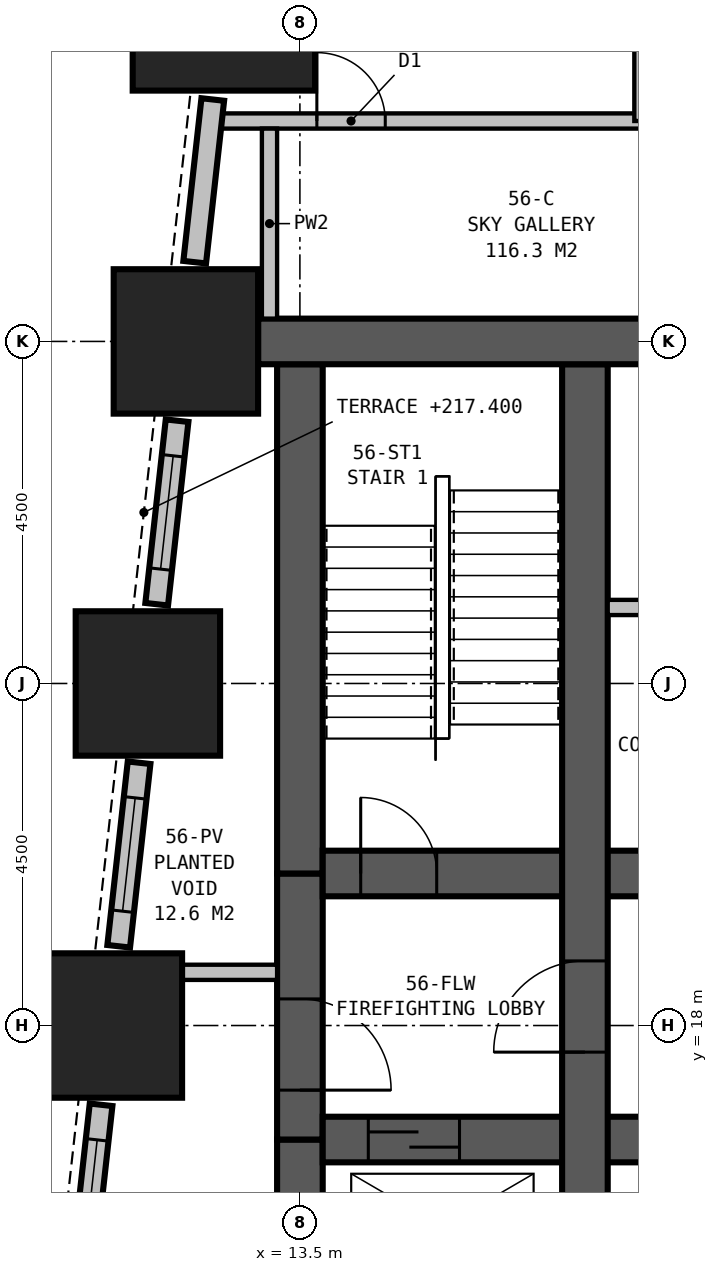
"""IFC4 building model, lengths in metres.
Left out: names, types, materials, properties, quantities, classifications, styles, units other than length and angle.
Written with IfcOpenShell. Run it as: python <this file> out.ifc"""

import sys

from ifc_helpers import new_model, si_unit, direction, frame, frame_2d, origin, origin_2d, place, context, subcontext, project, spatial, rectangle, extrude, element, fill, save


model = new_model("IFC4")
c1 = context("Model", 3, precision=1e-05, world=origin(), true_north=direction((0.0, 1.0)))
c2 = subcontext(c1, "Body", "Model", "MODEL_VIEW")
j1 = project(units=[si_unit("LENGTHUNIT", "METRE"), si_unit("PLANEANGLEUNIT", "RADIAN")], contexts=[c1])
p1 = place(None, origin())
s1 = spatial("IfcSite", under=j1, at=p1, CompositionType="ELEMENT")
p2 = place(p1, origin())
s2 = spatial("IfcBuilding", under=s1, at=p2, CompositionType="ELEMENT")
p3 = place(p2, frame((0.0, 0.0, 217.4)))
s3 = spatial("IfcBuildingStorey", under=s2, at=p3, CompositionType="ELEMENT", Elevation=217.4)
p4 = place(p3, frame((12.5, 31.5, 0.0), z_axis=(0.0, 0.0, 1.0), x_axis=(1.0, 0.0, 0.0)))
e1 = element("IfcColumn", 1, at=p4, inside=s3, PredefinedType="COLUMN", context=c2, shape_type="SweptSolid", body=[
    extrude(rectangle(XDim=2.4, YDim=2.4, at=origin_2d()), origin(), (0.0, 0.0, 1.0), 3.9),
])
for number, where, z_axis, x_axis in (
    (2, (12.0, 27.0, 0.0), (0.0, 0.0, 1.0), (1.0, 0.0, 0.0)),
    (3, (11.5, 22.5, 0.0), (0.0, 0.0, 1.0), (1.0, 0.0, 0.0)),
    (4, (11.0, 18.0, 0.0), (0.0, 0.0, 1.0), (1.0, 0.0, 0.0)),
):
    element("IfcColumn", number, at=place(p3, frame(where, z_axis=z_axis, x_axis=x_axis)), inside=s3, PredefinedType="COLUMN", context=c2, shape_type="SweptSolid", body=[
        extrude(rectangle(XDim=1.9, YDim=1.9, at=origin_2d()), origin(), (0.0, 0.0, 1.0), 3.9),
    ])
p5 = place(p3, frame((36.3, 27.0, 0.0), z_axis=(0.0, 0.0, 1.0), x_axis=(-1.0, 0.0, 0.0)))
e5 = element("IfcWall", 5, at=p5, inside=s3, PredefinedType="SHEAR", context=c2, shape_type="SweptSolid", body=[
    extrude(rectangle(XDim=23.35, YDim=0.6, at=frame_2d((11.675, 0.0))), origin(), (0.0, 0.0, 1.0), 3.9),
])
p6 = place(p5, frame((17.05, 0.0, 0.0)))
e6 = element("IfcOpeningElement", 6, at=p6, cuts=e5, PredefinedType="OPENING", context=c2, shape_type="SweptSolid", body=[
    extrude(rectangle(XDim=1.0, YDim=2.1, at=frame_2d((0.5, 1.05))), frame((0.0, 0.31, 0.0), z_axis=(0.0, -1.0, 0.0), x_axis=(1.0, 0.0, 0.0)), (0.0, 0.0, 1.0), 0.62),
])
p7 = place(p5, frame((12.05, 0.0, 0.0)))
e7 = element("IfcOpeningElement", 7, at=p7, cuts=e5, PredefinedType="OPENING", context=c2, shape_type="SweptSolid", body=[
    extrude(rectangle(XDim=1.0, YDim=2.1, at=frame_2d((0.5, 1.05))), frame((0.0, 0.31, 0.0), z_axis=(0.0, -1.0, 0.0), x_axis=(1.0, 0.0, 0.0)), (0.0, 0.0, 1.0), 0.62),
])
p8 = place(p5, frame((7.05, 0.0, 0.0)))
e8 = element("IfcOpeningElement", 8, at=p8, cuts=e5, PredefinedType="OPENING", context=c2, shape_type="SweptSolid", body=[
    extrude(rectangle(XDim=1.0, YDim=2.1, at=frame_2d((0.5, 1.05))), frame((0.0, 0.31, 0.0), z_axis=(0.0, -1.0, 0.0), x_axis=(1.0, 0.0, 0.0)), (0.0, 0.0, 1.0), 0.62),
])
p9 = place(p3, frame((17.25, 13.8, 0.0), z_axis=(0.0, 0.0, 1.0), x_axis=(0.0, 1.0, 0.0)))
e9 = element("IfcWall", 9, at=p9, inside=s3, PredefinedType="SHEAR", context=c2, shape_type="SweptSolid", body=[
    extrude(rectangle(XDim=12.9, YDim=0.6, at=frame_2d((6.45, 0.0))), origin(), (0.0, 0.0, 1.0), 3.9),
])
p10 = place(p9, frame((3.85, 0.0, 0.0)))
e10 = element("IfcOpeningElement", 10, at=p10, cuts=e9, PredefinedType="OPENING", context=c2, shape_type="SweptSolid", body=[
    extrude(rectangle(XDim=1.2, YDim=2.1, at=frame_2d((0.6, 1.05))), frame((0.0, 0.31, 0.0), z_axis=(0.0, -1.0, 0.0), x_axis=(1.0, 0.0, 0.0)), (0.0, 0.0, 1.0), 0.62),
])
p11 = place(p3, frame((13.8, 16.5, 0.0), z_axis=(0.0, 0.0, 1.0), x_axis=(1.0, 0.0, 0.0)))
e11 = element("IfcWall", 11, at=p11, inside=s3, PredefinedType="SHEAR", context=c2, shape_type="SweptSolid", body=[
    extrude(rectangle(XDim=21.9, YDim=0.6, at=frame_2d((10.95, 0.0))), origin(), (0.0, 0.0, 1.0), 3.9),
])
p12 = place(p11, frame((5.75, 0.0, 0.0), z_axis=(0.0, 0.0, 1.0), x_axis=(-1.0, 0.0, 0.0)))
e12 = element("IfcOpeningElement", 12, at=p12, cuts=e11, PredefinedType="OPENING", context=c2, shape_type="SweptSolid", body=[
    extrude(rectangle(XDim=1.0, YDim=2.1, at=frame_2d((0.5, 1.05))), frame((0.0, 0.31, 0.0), z_axis=(0.0, -1.0, 0.0), x_axis=(1.0, 0.0, 0.0)), (0.0, 0.0, 1.0), 0.62),
])
p13 = place(p11, frame((10.2, 0.0, 0.0), z_axis=(0.0, 0.0, 1.0), x_axis=(-1.0, 0.0, 0.0)))
e13 = element("IfcOpeningElement", 13, at=p13, cuts=e11, PredefinedType="OPENING", context=c2, shape_type="SweptSolid", body=[
    extrude(rectangle(XDim=1.0, YDim=2.1, at=frame_2d((0.5, 1.05))), frame((0.0, 0.31, 0.0), z_axis=(0.0, -1.0, 0.0), x_axis=(1.0, 0.0, 0.0)), (0.0, 0.0, 1.0), 0.62),
])
p14 = place(p11, frame((12.7, 0.0, 0.0), z_axis=(0.0, 0.0, 1.0), x_axis=(-1.0, 0.0, 0.0)))
e14 = element("IfcOpeningElement", 14, at=p14, cuts=e11, PredefinedType="OPENING", context=c2, shape_type="SweptSolid", body=[
    extrude(rectangle(XDim=1.0, YDim=2.1, at=frame_2d((0.5, 1.05))), frame((0.0, 0.31, 0.0), z_axis=(0.0, -1.0, 0.0), x_axis=(1.0, 0.0, 0.0)), (0.0, 0.0, 1.0), 0.62),
])
p15 = place(p11, frame((17.15, 0.0, 0.0), z_axis=(0.0, 0.0, 1.0), x_axis=(-1.0, 0.0, 0.0)))
e15 = element("IfcOpeningElement", 15, at=p15, cuts=e11, PredefinedType="OPENING", context=c2, shape_type="SweptSolid", body=[
    extrude(rectangle(XDim=1.0, YDim=2.1, at=frame_2d((0.5, 1.05))), frame((0.0, 0.31, 0.0), z_axis=(0.0, -1.0, 0.0), x_axis=(1.0, 0.0, 0.0)), (0.0, 0.0, 1.0), 0.62),
])
p16 = place(p11, frame((0.6, 0.0, 0.0)))
e16 = element("IfcOpeningElement", 16, at=p16, cuts=e11, PredefinedType="OPENING", context=c2, shape_type="SweptSolid", body=[
    extrude(rectangle(XDim=1.2, YDim=2.1, at=frame_2d((0.6, 1.05))), frame((0.0, 0.31, 0.0), z_axis=(0.0, -1.0, 0.0), x_axis=(1.0, 0.0, 0.0)), (0.0, 0.0, 1.0), 0.62),
])
p17 = place(p11, frame((19.6, 0.0, 0.0)))
e17 = element("IfcOpeningElement", 17, at=p17, cuts=e11, PredefinedType="OPENING", context=c2, shape_type="SweptSolid", body=[
    extrude(rectangle(XDim=1.2, YDim=2.1, at=frame_2d((0.6, 1.05))), frame((0.0, 0.31, 0.0), z_axis=(0.0, -1.0, 0.0), x_axis=(1.0, 0.0, 0.0)), (0.0, 0.0, 1.0), 0.62),
])
p18 = place(p3, frame((13.8, 20.0, 0.0), z_axis=(0.0, 0.0, 1.0), x_axis=(1.0, 0.0, 0.0)))
e18 = element("IfcWall", 18, at=p18, inside=s3, PredefinedType="SHEAR", context=c2, shape_type="SweptSolid", body=[
    extrude(rectangle(XDim=21.9, YDim=0.6, at=frame_2d((10.95, 0.0))), origin(), (0.0, 0.0, 1.0), 3.9),
])
p19 = place(p18, frame((0.5, 0.0, 0.0)))
e19 = element("IfcOpeningElement", 19, at=p19, cuts=e18, PredefinedType="OPENING", context=c2, shape_type="SweptSolid", body=[
    extrude(rectangle(XDim=1.0, YDim=2.1, at=frame_2d((0.5, 1.05))), frame((0.0, 0.31, 0.0), z_axis=(0.0, -1.0, 0.0), x_axis=(1.0, 0.0, 0.0)), (0.0, 0.0, 1.0), 0.62),
])
p20 = place(p18, frame((20.5, 0.0, 0.0)))
e20 = element("IfcOpeningElement", 20, at=p20, cuts=e18, PredefinedType="OPENING", context=c2, shape_type="SweptSolid", body=[
    extrude(rectangle(XDim=1.0, YDim=2.1, at=frame_2d((0.5, 1.05))), frame((0.0, 0.31, 0.0), z_axis=(0.0, -1.0, 0.0), x_axis=(1.0, 0.0, 0.0)), (0.0, 0.0, 1.0), 0.62),
])
p21 = place(p18, frame((9.15, 0.0, 0.0)))
e21 = element("IfcOpeningElement", 21, at=p21, cuts=e18, PredefinedType="OPENING", context=c2, shape_type="SweptSolid", body=[
    extrude(rectangle(XDim=1.1, YDim=2.1, at=frame_2d((0.55, 1.05))), frame((0.0, 0.31, 0.0), z_axis=(0.0, -1.0, 0.0), x_axis=(1.0, 0.0, 0.0)), (0.0, 0.0, 1.0), 0.62),
])
p22 = place(p18, frame((11.65, 0.0, 0.0)))
e22 = element("IfcOpeningElement", 22, at=p22, cuts=e18, PredefinedType="OPENING", context=c2, shape_type="SweptSolid", body=[
    extrude(rectangle(XDim=1.1, YDim=2.1, at=frame_2d((0.55, 1.05))), frame((0.0, 0.31, 0.0), z_axis=(0.0, -1.0, 0.0), x_axis=(1.0, 0.0, 0.0)), (0.0, 0.0, 1.0), 0.62),
])
p23 = place(p18, frame((14.15, 0.0, 0.0)))
e23 = element("IfcOpeningElement", 23, at=p23, cuts=e18, PredefinedType="OPENING", context=c2, shape_type="SweptSolid", body=[
    extrude(rectangle(XDim=1.1, YDim=2.1, at=frame_2d((0.55, 1.05))), frame((0.0, 0.31, 0.0), z_axis=(0.0, -1.0, 0.0), x_axis=(1.0, 0.0, 0.0)), (0.0, 0.0, 1.0), 0.62),
])
p24 = place(p18, frame((16.65, 0.0, 0.0)))
e24 = element("IfcOpeningElement", 24, at=p24, cuts=e18, PredefinedType="OPENING", context=c2, shape_type="SweptSolid", body=[
    extrude(rectangle(XDim=1.1, YDim=2.1, at=frame_2d((0.55, 1.05))), frame((0.0, 0.31, 0.0), z_axis=(0.0, -1.0, 0.0), x_axis=(1.0, 0.0, 0.0)), (0.0, 0.0, 1.0), 0.62),
])
p25 = place(p18, frame((5.75, 0.0, 0.0), z_axis=(0.0, 0.0, 1.0), x_axis=(-1.0, 0.0, 0.0)))
e25 = element("IfcOpeningElement", 25, at=p25, cuts=e18, PredefinedType="OPENING", context=c2, shape_type="SweptSolid", body=[
    extrude(rectangle(XDim=1.0, YDim=2.1, at=frame_2d((0.5, 1.05))), frame((0.0, 0.31, 0.0), z_axis=(0.0, -1.0, 0.0), x_axis=(1.0, 0.0, 0.0)), (0.0, 0.0, 1.0), 0.62),
])
p26 = place(p18, frame((6.7, 0.0, 0.0)))
e26 = element("IfcOpeningElement", 26, at=p26, cuts=e18, PredefinedType="OPENING", context=c2, shape_type="SweptSolid", body=[
    extrude(rectangle(XDim=1.0, YDim=2.1, at=frame_2d((0.5, 1.05))), frame((0.0, 0.31, 0.0), z_axis=(0.0, -1.0, 0.0), x_axis=(1.0, 0.0, 0.0)), (0.0, 0.0, 1.0), 0.62),
])
p27 = place(p3, frame((13.5, 26.7, 0.0), z_axis=(0.0, 0.0, 1.0), x_axis=(0.0, -1.0, 0.0)))
e27 = element("IfcWall", 27, at=p27, inside=s3, PredefinedType="SHEAR", context=c2, shape_type="SweptSolid", body=[
    extrude(rectangle(XDim=6.7, YDim=0.6, at=frame_2d((3.35, 0.0))), origin(), (0.0, 0.0, 1.0), 3.9),
])
p28 = place(p3, frame((13.5, 20.0, 0.0), z_axis=(0.0, 0.0, 1.0), x_axis=(0.0, -1.0, 0.0)))
e28 = element("IfcWall", 28, at=p28, inside=s3, PredefinedType="SHEAR", context=c2, shape_type="SweptSolid", body=[
    extrude(rectangle(XDim=3.5, YDim=0.6, at=frame_2d((1.75, 0.0))), origin(), (0.0, 0.0, 1.0), 3.9),
])
p29 = place(p28, frame((1.65, 0.0, 0.0)))
e29 = element("IfcOpeningElement", 29, at=p29, cuts=e28, PredefinedType="OPENING", context=c2, shape_type="SweptSolid", body=[
    extrude(rectangle(XDim=1.2, YDim=2.1, at=frame_2d((0.6, 1.05))), frame((0.0, 0.31, 0.0), z_axis=(0.0, -1.0, 0.0), x_axis=(1.0, 0.0, 0.0)), (0.0, 0.0, 1.0), 0.62),
])
p30 = place(p3, frame((13.5, 16.5, 0.0), z_axis=(0.0, 0.0, 1.0), x_axis=(0.0, -1.0, 0.0)))
e30 = element("IfcWall", 30, at=p30, inside=s3, PredefinedType="SHEAR", context=c2, shape_type="SweptSolid", body=[
    extrude(rectangle(XDim=2.7, YDim=0.6, at=frame_2d((1.35, 0.0))), origin(), (0.0, 0.0, 1.0), 3.9),
])
p31 = place(p3, frame((12.354, 30.183, 0.0), z_axis=(0.0, 0.0, 1.0), x_axis=(-0.110431526075, -0.993883734674, 0.0)))
e31 = element("IfcWall", 31, at=p31, inside=s3, PredefinedType="STANDARD", context=c2, shape_type="SweptSolid", body=[
    extrude(rectangle(XDim=2.153, YDim=0.3, at=frame_2d((1.077, 0.0))), origin(), (0.0, 0.0, 1.0), 2.15),
])
p32 = place(p3, frame((11.884, 25.957, 0.0), z_axis=(0.0, 0.0, 1.0), x_axis=(-0.110343286306, -0.993893535127, 0.0)))
e32 = element("IfcWall", 32, at=p32, inside=s3, PredefinedType="STANDARD", context=c2, shape_type="SweptSolid", body=[
    extrude(rectangle(XDim=2.429, YDim=0.3, at=frame_2d((1.215, 0.0))), origin(), (0.0, 0.0, 1.0), 2.15),
])
p33 = place(p32, frame((0.465, 0.0, 0.5)))
e33 = element("IfcOpeningElement", 33, at=p33, cuts=e32, PredefinedType="OPENING", context=c2, shape_type="SweptSolid", body=[
    extrude(rectangle(XDim=1.5, YDim=1.5, at=frame_2d((0.75, 0.75))), frame((0.0, 0.16, 0.0), z_axis=(0.0, -1.0, 0.0), x_axis=(1.0, 0.0, 0.0)), (0.0, 0.0, 1.0), 0.32),
])
p34 = place(p3, frame((11.384, 21.457, 0.0), z_axis=(0.0, 0.0, 1.0), x_axis=(-0.110343286306, -0.993893535127, 0.0)))
e34 = element("IfcWall", 34, at=p34, inside=s3, PredefinedType="STANDARD", context=c2, shape_type="SweptSolid", body=[
    extrude(rectangle(XDim=2.429, YDim=0.3, at=frame_2d((1.215, 0.0))), origin(), (0.0, 0.0, 1.0), 2.15),
])
p35 = place(p34, frame((0.465, 0.0, 0.5)))
e35 = element("IfcOpeningElement", 35, at=p35, cuts=e34, PredefinedType="OPENING", context=c2, shape_type="SweptSolid", body=[
    extrude(rectangle(XDim=1.5, YDim=1.5, at=frame_2d((0.75, 0.75))), frame((0.0, 0.16, 0.0), z_axis=(0.0, -1.0, 0.0), x_axis=(1.0, 0.0, 0.0)), (0.0, 0.0, 1.0), 0.32),
])
p36 = place(p3, frame((10.884, 16.957, 0.0), z_axis=(0.0, 0.0, 1.0), x_axis=(-0.110343286306, -0.993893535127, 0.0)))
e36 = element("IfcWall", 36, at=p36, inside=s3, PredefinedType="STANDARD", context=c2, shape_type="SweptSolid", body=[
    extrude(rectangle(XDim=2.429, YDim=0.3, at=frame_2d((1.215, 0.0))), origin(), (0.0, 0.0, 1.0), 2.15),
])
p37 = place(p36, frame((0.464, 0.0, 0.5)))
e37 = element("IfcOpeningElement", 37, at=p37, cuts=e36, PredefinedType="OPENING", context=c2, shape_type="SweptSolid", body=[
    extrude(rectangle(XDim=1.5, YDim=1.5, at=frame_2d((0.75, 0.75))), frame((0.0, 0.16, 0.0), z_axis=(0.0, -1.0, 0.0), x_axis=(1.0, 0.0, 0.0)), (0.0, 0.0, 1.0), 0.32),
])
p38 = place(p3, frame((12.473, 29.9, 0.0), z_axis=(0.0, 0.0, 1.0), x_axis=(1.0, 0.0, 0.0)))
e38 = element("IfcWall", 38, at=p38, inside=s3, PredefinedType="PARTITIONING", context=c2, shape_type="SweptSolid", body=[
    extrude(rectangle(XDim=25.827, YDim=0.2, at=frame_2d((12.914, 0.0))), origin(), (0.0, 0.0, 1.0), 3.65),
])
p39 = place(p38, frame((1.25, 0.0, 0.0)))
e39 = element("IfcOpeningElement", 39, at=p39, cuts=e38, PredefinedType="OPENING", context=c2, shape_type="SweptSolid", body=[
    extrude(rectangle(XDim=0.9, YDim=2.1, at=frame_2d((0.45, 1.05))), frame((0.0, 0.11, 0.0), z_axis=(0.0, -1.0, 0.0), x_axis=(1.0, 0.0, 0.0)), (0.0, 0.0, 1.0), 0.22),
])
p40 = place(p38, frame((8.677, 0.0, 0.0)))
e40 = element("IfcOpeningElement", 40, at=p40, cuts=e38, PredefinedType="OPENING", context=c2, shape_type="SweptSolid", body=[
    extrude(rectangle(XDim=0.9, YDim=2.1, at=frame_2d((0.45, 1.05))), frame((0.0, 0.11, 0.0), z_axis=(0.0, -1.0, 0.0), x_axis=(1.0, 0.0, 0.0)), (0.0, 0.0, 1.0), 0.22),
])
p41 = place(p38, frame((12.777, 0.0, 0.0)))
e41 = element("IfcOpeningElement", 41, at=p41, cuts=e38, PredefinedType="OPENING", context=c2, shape_type="SweptSolid", body=[
    extrude(rectangle(XDim=0.9, YDim=2.1, at=frame_2d((0.45, 1.05))), frame((0.0, 0.11, 0.0), z_axis=(0.0, -1.0, 0.0), x_axis=(1.0, 0.0, 0.0)), (0.0, 0.0, 1.0), 0.22),
])
p42 = place(p38, frame((22.177, 0.0, 0.0)))
e42 = element("IfcOpeningElement", 42, at=p42, cuts=e38, PredefinedType="OPENING", context=c2, shape_type="SweptSolid", body=[
    extrude(rectangle(XDim=0.9, YDim=2.1, at=frame_2d((0.45, 1.05))), frame((0.0, 0.11, 0.0), z_axis=(0.0, -1.0, 0.0), x_axis=(1.0, 0.0, 0.0)), (0.0, 0.0, 1.0), 0.22),
])
p43 = place(p38, frame((24.227, 0.0, 0.0)))
e43 = element("IfcOpeningElement", 43, at=p43, cuts=e38, PredefinedType="OPENING", context=c2, shape_type="SweptSolid", body=[
    extrude(rectangle(XDim=0.9, YDim=2.1, at=frame_2d((0.45, 1.05))), frame((0.0, 0.11, 0.0), z_axis=(0.0, -1.0, 0.0), x_axis=(1.0, 0.0, 0.0)), (0.0, 0.0, 1.0), 0.22),
])
p44 = place(p3, frame((13.2, 18.7, 0.0), z_axis=(0.0, 0.0, 1.0), x_axis=(-1.0, 0.0, 0.0)))
e44 = element("IfcWall", 44, at=p44, inside=s3, PredefinedType="PARTITIONING", context=c2, shape_type="SweptSolid", body=[
    extrude(rectangle(XDim=1.25, YDim=0.2, at=frame_2d((0.625, 0.0))), origin(), (0.0, 0.0, 1.0), 3.65),
])
p45 = place(p3, frame((13.1, 27.3, 0.0), z_axis=(0.0, 0.0, 1.0), x_axis=(0.0, 1.0, 0.0)))
e45 = element("IfcWall", 45, at=p45, inside=s3, PredefinedType="PARTITIONING", context=c2, shape_type="SweptSolid", body=[
    extrude(rectangle(XDim=2.5, YDim=0.2, at=frame_2d((1.25, 0.0))), origin(), (0.0, 0.0, 1.0), 2.15),
])
p46 = place(p3, frame((18.0, 29.9, 0.0), z_axis=(0.0, 0.0, 1.0), x_axis=(0.0, 1.0, 0.0)))
e46 = element("IfcWall", 46, at=p46, inside=s3, PredefinedType="PARTITIONING", context=c2, shape_type="SweptSolid", body=[
    extrude(rectangle(XDim=10.6, YDim=0.2, at=frame_2d((5.3, 0.0))), origin(), (0.0, 0.0, 1.0), 2.65),
])
p47 = place(p3, frame((17.55, 23.5, 0.0), z_axis=(0.0, 0.0, 1.0), x_axis=(1.0, 0.0, 0.0)))
e47 = element("IfcWall", 47, at=p47, inside=s3, PredefinedType="PARTITIONING", context=c2, shape_type="SweptSolid", body=[
    extrude(rectangle(XDim=14.4, YDim=0.2, at=frame_2d((7.2, 0.0))), origin(), (0.0, 0.0, 1.0), 3.65),
])
p48 = place(p47, frame((0.45, 0.0, 0.0)))
e48 = element("IfcOpeningElement", 48, at=p48, cuts=e47, PredefinedType="OPENING", context=c2, shape_type="SweptSolid", body=[
    extrude(rectangle(XDim=1.0, YDim=2.1, at=frame_2d((0.5, 1.05))), frame((0.0, 0.11, 0.0), z_axis=(0.0, -1.0, 0.0), x_axis=(1.0, 0.0, 0.0)), (0.0, 0.0, 1.0), 0.22),
])
p49 = place(p33, origin())
e49 = element("IfcWindow", 49, at=p49, inside=s3, PartitioningType="SINGLE_PANEL", PredefinedType="WINDOW", context=c2, shape_type="SweptSolid", body=[
    extrude(rectangle(XDim=1.5, YDim=1.5, at=frame_2d((0.75, 0.75))), frame((0.0, 0.03, 0.0), z_axis=(0.0, -1.0, 0.0), x_axis=(1.0, 0.0, 0.0)), (0.0, 0.0, 1.0), 0.06),
])
fill(e33, e49)
p50 = place(p35, origin())
e50 = element("IfcWindow", 50, at=p50, inside=s3, PartitioningType="SINGLE_PANEL", PredefinedType="WINDOW", context=c2, shape_type="SweptSolid", body=[
    extrude(rectangle(XDim=1.5, YDim=1.5, at=frame_2d((0.75, 0.75))), frame((0.0, 0.03, 0.0), z_axis=(0.0, -1.0, 0.0), x_axis=(1.0, 0.0, 0.0)), (0.0, 0.0, 1.0), 0.06),
])
fill(e35, e50)
p51 = place(p37, origin())
e51 = element("IfcWindow", 51, at=p51, inside=s3, PartitioningType="SINGLE_PANEL", PredefinedType="WINDOW", context=c2, shape_type="SweptSolid", body=[
    extrude(rectangle(XDim=1.5, YDim=1.5, at=frame_2d((0.75, 0.75))), frame((0.0, 0.03, 0.0), z_axis=(0.0, -1.0, 0.0), x_axis=(1.0, 0.0, 0.0)), (0.0, 0.0, 1.0), 0.06),
])
fill(e37, e51)
p52 = place(p39, origin())
e52 = element("IfcDoor", 52, at=p52, inside=s3, OperationType="SINGLE_SWING_LEFT", PredefinedType="DOOR", context=c2, shape_type="SweptSolid", body=[
    extrude(rectangle(XDim=0.9, YDim=2.1, at=frame_2d((0.45, 1.05))), frame((0.0, 0.025, 0.0), z_axis=(0.0, -1.0, 0.0), x_axis=(1.0, 0.0, 0.0)), (0.0, 0.0, 1.0), 0.05),
])
fill(e39, e52)
p53 = place(p29, origin())
e53 = element("IfcDoor", 53, at=p53, inside=s3, OperationType="SINGLE_SWING_RIGHT", PredefinedType="DOOR", context=c2, shape_type="SweptSolid", body=[
    extrude(rectangle(XDim=1.2, YDim=2.1, at=frame_2d((0.6, 1.05))), frame((0.0, 0.3, 0.0), z_axis=(0.0, -1.0, 0.0), x_axis=(1.0, 0.0, 0.0)), (0.0, 0.0, 1.0), 0.6),
])
fill(e29, e53)
p54 = place(p10, origin())
e54 = element("IfcDoor", 54, at=p54, inside=s3, OperationType="SINGLE_SWING_LEFT", PredefinedType="DOOR", context=c2, shape_type="SweptSolid", body=[
    extrude(rectangle(XDim=1.2, YDim=2.1, at=frame_2d((0.6, 1.05))), frame((0.0, 0.3, 0.0), z_axis=(0.0, -1.0, 0.0), x_axis=(1.0, 0.0, 0.0)), (0.0, 0.0, 1.0), 0.6),
])
fill(e10, e54)
p55 = place(p19, origin())
e55 = element("IfcDoor", 55, at=p55, inside=s3, OperationType="SINGLE_SWING_LEFT", PredefinedType="DOOR", context=c2, shape_type="SweptSolid", body=[
    extrude(rectangle(XDim=1.0, YDim=2.1, at=frame_2d((0.5, 1.05))), frame((0.0, 0.3, 0.0), z_axis=(0.0, -1.0, 0.0), x_axis=(1.0, 0.0, 0.0)), (0.0, 0.0, 1.0), 0.6),
])
fill(e19, e55)
p56 = place(p16, origin())
e56 = element("IfcDoor", 56, at=p56, inside=s3, OperationType="SLIDING_TO_LEFT", PredefinedType="DOOR", context=c2, shape_type="SweptSolid", body=[
    extrude(rectangle(XDim=1.2, YDim=2.1, at=frame_2d((0.6, 1.05))), frame((0.0, 0.3, 0.0), z_axis=(0.0, -1.0, 0.0), x_axis=(1.0, 0.0, 0.0)), (0.0, 0.0, 1.0), 0.6),
])
fill(e16, e56)
save(model, sys.argv[1])
